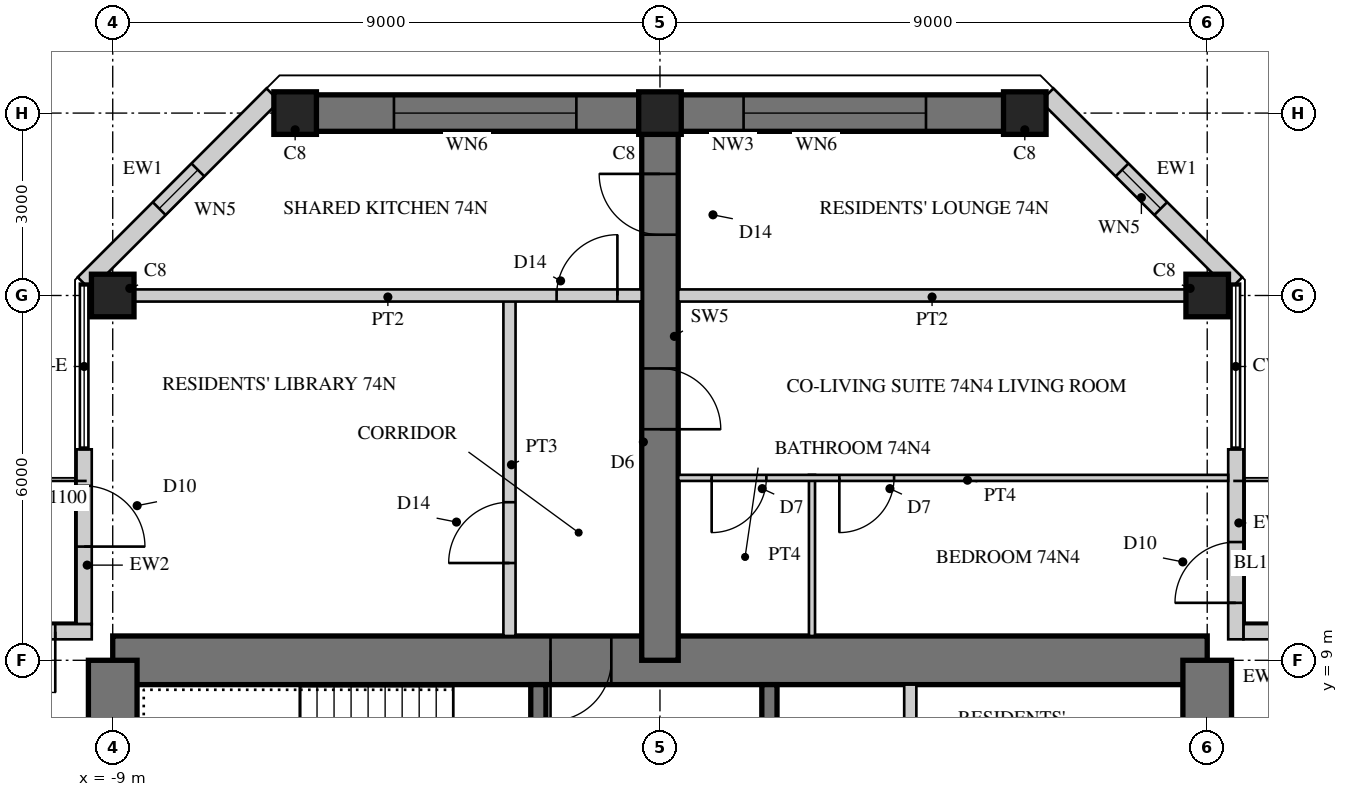
"""IFC4 building model, lengths in metres.
Left out: names, types, materials, properties, quantities, classifications, styles, units other than length and angle.
Written with IfcOpenShell. Run it as: python <this file> out.ifc"""

import sys

from ifc_helpers import new_model, si_unit, direction, frame, frame_2d, origin, origin_2d, place, context, subcontext, project, spatial, rectangle, hollow_rectangle, extrude, element, fill, save


model = new_model("IFC4")
c1 = context("Model", 3, precision=1e-05, world=origin(), true_north=direction((0.0, 1.0)))
c2 = subcontext(c1, "Body", "Model", "MODEL_VIEW")
j1 = project(units=[si_unit("LENGTHUNIT", "METRE"), si_unit("PLANEANGLEUNIT", "RADIAN")], contexts=[c1])
p1 = place(None, origin())
s1 = spatial("IfcSite", under=j1, at=p1, CompositionType="ELEMENT")
p2 = place(p1, origin())
s2 = spatial("IfcBuilding", under=s1, at=p2, CompositionType="ELEMENT")
p3 = place(p2, frame((0.0, 0.0, 284.9)))
s3 = spatial("IfcBuildingStorey", under=s2, at=p3, CompositionType="ELEMENT", Elevation=284.9)
p4 = place(p3, frame((9.0, 9.0, 0.0), z_axis=(0.0, 0.0, 1.0), x_axis=(-1.0, 0.0, 0.0)))
e1 = element("IfcWall", 1, at=p4, inside=s3, PredefinedType="SHEAR", context=c2, shape_type="SweptSolid", body=[
    extrude(rectangle(XDim=18.0, YDim=0.8, at=frame_2d((9.0, 0.0))), origin(), (0.0, 0.0, 1.0), 3.4),
])
p5 = place(p4, frame((9.8, 0.0, 0.0)))
e2 = element("IfcOpeningElement", 2, at=p5, cuts=e1, PredefinedType="OPENING", context=c2, shape_type="SweptSolid", body=[
    extrude(rectangle(XDim=1.0, YDim=2.4, at=frame_2d((0.5, 1.2))), frame((0.0, 0.41, 0.0), z_axis=(0.0, -1.0, 0.0), x_axis=(1.0, 0.0, 0.0)), (0.0, 0.0, 1.0), 0.82),
])
p6 = place(p3, frame((9.0, -9.0, 0.0), z_axis=(0.0, 0.0, 1.0), x_axis=(0.0, 1.0, 0.0)))
e3 = element("IfcWall", 3, at=p6, inside=s3, PredefinedType="SHEAR", context=c2, shape_type="SweptSolid", body=[
    extrude(rectangle(XDim=18.0, YDim=0.8, at=frame_2d((9.0, 0.0))), origin(), (0.0, 0.0, 1.0), 3.4),
])
p7 = place(p6, frame((9.8, 0.0, 0.0)))
e4 = element("IfcOpeningElement", 4, at=p7, cuts=e3, PredefinedType="OPENING", context=c2, shape_type="SweptSolid", body=[
    extrude(rectangle(XDim=1.0, YDim=2.4, at=frame_2d((0.5, 1.2))), frame((0.0, 0.41, 0.0), z_axis=(0.0, -1.0, 0.0), x_axis=(1.0, 0.0, 0.0)), (0.0, 0.0, 1.0), 0.82),
])
p8 = place(p3, frame((-9.0, 9.0, 0.0), z_axis=(0.0, 0.0, 1.0), x_axis=(0.0, -1.0, 0.0)))
e5 = element("IfcWall", 5, at=p8, inside=s3, PredefinedType="SHEAR", context=c2, shape_type="SweptSolid", body=[
    extrude(rectangle(XDim=18.0, YDim=0.8, at=frame_2d((9.0, 0.0))), origin(), (0.0, 0.0, 1.0), 3.4),
])
p9 = place(p8, frame((9.8, 0.0, 0.0)))
e6 = element("IfcOpeningElement", 6, at=p9, cuts=e5, PredefinedType="OPENING", context=c2, shape_type="SweptSolid", body=[
    extrude(rectangle(XDim=1.0, YDim=2.4, at=frame_2d((0.5, 1.2))), frame((0.0, 0.41, 0.0), z_axis=(0.0, -1.0, 0.0), x_axis=(1.0, 0.0, 0.0)), (0.0, 0.0, 1.0), 0.82),
])
p10 = place(p3, frame((1.8, 1.875, 0.0), z_axis=(0.0, 0.0, 1.0), x_axis=(0.0, 1.0, 0.0)))
e7 = element("IfcWall", 7, at=p10, inside=s3, PredefinedType="SHEAR", context=c2, shape_type="SweptSolid", body=[
    extrude(rectangle(XDim=6.725, YDim=0.25, at=frame_2d((3.363, 0.0))), origin(), (0.0, 0.0, 1.0), 3.4),
])
p11 = place(p10, frame((1.875, 0.0, 0.0)))
e8 = element("IfcOpeningElement", 8, at=p11, cuts=e7, PredefinedType="OPENING", context=c2, shape_type="SweptSolid", body=[
    extrude(rectangle(XDim=1.6, YDim=2.4, at=frame_2d((0.8, 1.2))), frame((0.0, 0.135, 0.0), z_axis=(0.0, -1.0, 0.0), x_axis=(1.0, 0.0, 0.0)), (0.0, 0.0, 1.0), 0.27),
])
p12 = place(p3, frame((4.117, 5.975, 0.0), z_axis=(0.0, 0.0, 1.0), x_axis=(0.0, 1.0, 0.0)))
e9 = element("IfcWall", 9, at=p12, inside=s3, PredefinedType="PARTITIONING", context=c2, shape_type="SweptSolid", body=[
    extrude(rectangle(XDim=2.625, YDim=0.2, at=frame_2d((1.312, 0.0))), origin(), (0.0, 0.0, 1.0), 3.4),
])
p13 = place(p3, frame((-2.0, 1.675, 0.0), z_axis=(0.0, 0.0, 1.0), x_axis=(0.0, 1.0, 0.0)))
e10 = element("IfcWall", 10, at=p13, inside=s3, PredefinedType="SHEAR", context=c2, shape_type="SweptSolid", body=[
    extrude(rectangle(XDim=6.925, YDim=0.25, at=frame_2d((3.462, 0.0))), origin(), (0.0, 0.0, 1.0), 3.4),
])
p14 = place(p13, frame((0.725, 0.0, 0.0)))
e11 = element("IfcOpeningElement", 11, at=p14, cuts=e10, PredefinedType="OPENING", context=c2, shape_type="SweptSolid", body=[
    extrude(rectangle(XDim=1.0, YDim=2.1, at=frame_2d((0.5, 1.05))), frame((0.0, 0.135, 0.0), z_axis=(0.0, -1.0, 0.0), x_axis=(1.0, 0.0, 0.0)), (0.0, 0.0, 1.0), 0.27),
])
p15 = place(p3, frame((0.0, 9.0, 0.0), z_axis=(0.0, 0.0, 1.0), x_axis=(0.0, 1.0, 0.0)))
e12 = element("IfcWall", 12, at=p15, inside=s3, PredefinedType="SHEAR", context=c2, shape_type="SweptSolid", body=[
    extrude(rectangle(XDim=9.0, YDim=0.6, at=frame_2d((4.5, 0.0))), origin(), (0.0, 0.0, 1.0), 3.4),
])
p16 = place(p15, frame((3.8, 0.0, 0.0)))
e13 = element("IfcOpeningElement", 13, at=p16, cuts=e12, PredefinedType="OPENING", context=c2, shape_type="SweptSolid", body=[
    extrude(rectangle(XDim=1.0, YDim=2.15, at=frame_2d((0.5, 1.075))), frame((0.0, 0.31, 0.0), z_axis=(0.0, -1.0, 0.0), x_axis=(1.0, 0.0, 0.0)), (0.0, 0.0, 1.0), 0.62),
])
p17 = place(p15, frame((7.0, 0.0, 0.0)))
e14 = element("IfcOpeningElement", 14, at=p17, cuts=e12, PredefinedType="OPENING", context=c2, shape_type="SweptSolid", body=[
    extrude(rectangle(XDim=1.0, YDim=2.2, at=frame_2d((0.5, 1.1))), frame((0.0, 0.31, 0.0), z_axis=(0.0, -1.0, 0.0), x_axis=(1.0, 0.0, 0.0)), (0.0, 0.0, 1.0), 0.62),
])
p18 = place(p3, frame((6.0, 18.0, 0.0), z_axis=(0.0, 0.0, 1.0), x_axis=(-1.0, 0.0, 0.0)))
e15 = element("IfcWall", 15, at=p18, inside=s3, PredefinedType="SHEAR", context=c2, shape_type="SweptSolid", body=[
    extrude(rectangle(XDim=12.0, YDim=0.6, at=frame_2d((6.0, 0.0))), origin(), (0.0, 0.0, 1.0), 3.4),
])
p19 = place(p18, frame((1.625, 0.0, 0.6)))
e16 = element("IfcOpeningElement", 16, at=p19, cuts=e15, PredefinedType="OPENING", context=c2, shape_type="SweptSolid", body=[
    extrude(rectangle(XDim=3.0, YDim=2.4, at=frame_2d((1.5, 1.2))), frame((0.0, 0.31, 0.0), z_axis=(0.0, -1.0, 0.0), x_axis=(1.0, 0.0, 0.0)), (0.0, 0.0, 1.0), 0.62),
])
p20 = place(p18, frame((7.375, 0.0, 0.6)))
e17 = element("IfcOpeningElement", 17, at=p20, cuts=e15, PredefinedType="OPENING", context=c2, shape_type="SweptSolid", body=[
    extrude(rectangle(XDim=3.0, YDim=2.4, at=frame_2d((1.5, 1.2))), frame((0.0, 0.31, 0.0), z_axis=(0.0, -1.0, 0.0), x_axis=(1.0, 0.0, 0.0)), (0.0, 0.0, 1.0), 0.62),
])
for number, where, z_axis, x_axis in (
    (18, (9.0, 15.0, 0.0), (0.0, 0.0, 1.0), (1.0, 0.0, 0.0)),
    (19, (-9.0, 15.0, 0.0), (0.0, 0.0, 1.0), (1.0, 0.0, 0.0)),
    (20, (6.0, 18.0, 0.0), (0.0, 0.0, 1.0), (1.0, 0.0, 0.0)),
    (21, (0.0, 18.0, 0.0), (0.0, 0.0, 1.0), (1.0, 0.0, 0.0)),
    (22, (-6.0, 18.0, 0.0), (0.0, 0.0, 1.0), (1.0, 0.0, 0.0)),
):
    element("IfcColumn", number, at=place(p3, frame(where, z_axis=z_axis, x_axis=x_axis)), inside=s3, PredefinedType="COLUMN", context=c2, shape_type="SweptSolid", body=[
        extrude(rectangle(XDim=0.7, YDim=0.7, at=origin_2d()), origin(), (0.0, 0.0, 1.0), 3.4),
    ])
p21 = place(p3, frame((12.47, 9.47, 0.0), z_axis=(0.0, 0.0, 1.0), x_axis=(-1.0, 0.0, 0.0)))
e23 = element("IfcWall", 23, at=p21, inside=s3, PredefinedType="SOLIDWALL", context=c2, shape_type="SweptSolid", body=[
    extrude(rectangle(XDim=2.875, YDim=0.25, at=frame_2d((1.438, 0.0))), origin(), (0.0, 0.0, 1.0), 3.2),
])
p22 = place(p21, frame((0.6, 0.0, 0.0)))
e24 = element("IfcOpeningElement", 24, at=p22, cuts=e23, PredefinedType="OPENING", context=c2, shape_type="SweptSolid", body=[
    extrude(rectangle(XDim=1.0, YDim=2.2, at=frame_2d((0.5, 1.1))), frame((0.0, 0.135, 0.0), z_axis=(0.0, -1.0, 0.0), x_axis=(1.0, 0.0, 0.0)), (0.0, 0.0, 1.0), 0.27),
])
p23 = place(p3, frame((9.47, 9.345, 0.0), z_axis=(0.0, 0.0, 1.0), x_axis=(0.0, 1.0, 0.0)))
e25 = element("IfcWall", 25, at=p23, inside=s3, PredefinedType="SOLIDWALL", context=c2, shape_type="SweptSolid", body=[
    extrude(rectangle(XDim=3.125, YDim=0.25, at=frame_2d((1.562, 0.0))), origin(), (0.0, 0.0, 1.0), 3.2),
])
p24 = place(p23, frame((0.6, 0.0, 0.0)))
e26 = element("IfcOpeningElement", 26, at=p24, cuts=e25, PredefinedType="OPENING", context=c2, shape_type="SweptSolid", body=[
    extrude(rectangle(XDim=1.0, YDim=2.2, at=frame_2d((0.5, 1.1))), frame((0.0, 0.135, 0.0), z_axis=(0.0, -1.0, 0.0), x_axis=(1.0, 0.0, 0.0)), (0.0, 0.0, 1.0), 0.27),
])
p25 = place(p3, frame((9.47, 15.195, 0.0), z_axis=(0.0, 0.0, 1.0), x_axis=(-0.70707898447, 0.707134576811, 0.0)))
e27 = element("IfcWall", 27, at=p25, inside=s3, PredefinedType="SOLIDWALL", context=c2, shape_type="SweptSolid", body=[
    extrude(rectangle(XDim=4.392, YDim=0.3, at=frame_2d((2.196, 0.0))), origin(), (0.0, 0.0, 1.0), 3.2),
])
p26 = place(p25, frame((1.746, 0.0, 0.3)))
e28 = element("IfcOpeningElement", 28, at=p26, cuts=e27, PredefinedType="OPENING", context=c2, shape_type="SweptSolid", body=[
    extrude(rectangle(XDim=0.9, YDim=2.4, at=frame_2d((0.45, 1.2))), frame((0.0, 0.16, 0.0), z_axis=(0.0, -1.0, 0.0), x_axis=(1.0, 0.0, 0.0)), (0.0, 0.0, 1.0), 0.32),
])
p27 = place(p3, frame((-6.365, 18.3, 0.0), z_axis=(0.0, 0.0, 1.0), x_axis=(-0.70707898447, -0.707134576811, 0.0)))
e29 = element("IfcWall", 29, at=p27, inside=s3, PredefinedType="SOLIDWALL", context=c2, shape_type="SweptSolid", body=[
    extrude(rectangle(XDim=4.392, YDim=0.3, at=frame_2d((2.196, 0.0))), origin(), (0.0, 0.0, 1.0), 3.2),
])
p28 = place(p27, frame((1.746, 0.0, 0.3)))
e30 = element("IfcOpeningElement", 30, at=p28, cuts=e29, PredefinedType="OPENING", context=c2, shape_type="SweptSolid", body=[
    extrude(rectangle(XDim=0.9, YDim=2.4, at=frame_2d((0.45, 1.2))), frame((0.0, 0.16, 0.0), z_axis=(0.0, -1.0, 0.0), x_axis=(1.0, 0.0, 0.0)), (0.0, 0.0, 1.0), 0.32),
])
p29 = place(p3, frame((-9.47, 12.47, 0.0), z_axis=(0.0, 0.0, 1.0), x_axis=(0.0, -1.0, 0.0)))
e31 = element("IfcWall", 31, at=p29, inside=s3, PredefinedType="SOLIDWALL", context=c2, shape_type="SweptSolid", body=[
    extrude(rectangle(XDim=2.875, YDim=0.25, at=frame_2d((1.438, 0.0))), origin(), (0.0, 0.0, 1.0), 3.2),
])
p30 = place(p29, frame((0.6, 0.0, 0.0)))
e32 = element("IfcOpeningElement", 32, at=p30, cuts=e31, PredefinedType="OPENING", context=c2, shape_type="SweptSolid", body=[
    extrude(rectangle(XDim=1.0, YDim=2.2, at=frame_2d((0.5, 1.1))), frame((0.0, 0.135, 0.0), z_axis=(0.0, -1.0, 0.0), x_axis=(1.0, 0.0, 0.0)), (0.0, 0.0, 1.0), 0.27),
])
p31 = place(p3, frame((-9.345, 9.47, 0.0), z_axis=(0.0, 0.0, 1.0), x_axis=(-1.0, 0.0, 0.0)))
e33 = element("IfcWall", 33, at=p31, inside=s3, PredefinedType="SOLIDWALL", context=c2, shape_type="SweptSolid", body=[
    extrude(rectangle(XDim=3.125, YDim=0.25, at=frame_2d((1.562, 0.0))), origin(), (0.0, 0.0, 1.0), 3.2),
])
p32 = place(p31, frame((0.6, 0.0, 0.0)))
e34 = element("IfcOpeningElement", 34, at=p32, cuts=e33, PredefinedType="OPENING", context=c2, shape_type="SweptSolid", body=[
    extrude(rectangle(XDim=1.0, YDim=2.2, at=frame_2d((0.5, 1.1))), frame((0.0, 0.135, 0.0), z_axis=(0.0, -1.0, 0.0), x_axis=(1.0, 0.0, 0.0)), (0.0, 0.0, 1.0), 0.27),
])
p33 = place(p3, frame((2.5, 9.4, 0.0), z_axis=(0.0, 0.0, 1.0), x_axis=(0.0, 1.0, 0.0)))
e35 = element("IfcWall", 35, at=p33, inside=s3, PredefinedType="PARTITIONING", context=c2, shape_type="SweptSolid", body=[
    extrude(rectangle(XDim=2.65, YDim=0.1, at=frame_2d((1.325, 0.0))), origin(), (0.0, 0.0, 1.0), 3.2),
])
p34 = place(p3, frame((9.345, 12.0, 0.0), z_axis=(0.0, 0.0, 1.0), x_axis=(-1.0, 0.0, 0.0)))
e36 = element("IfcWall", 36, at=p34, inside=s3, PredefinedType="PARTITIONING", context=c2, shape_type="SweptSolid", body=[
    extrude(rectangle(XDim=9.045, YDim=0.1, at=frame_2d((4.522, 0.0))), origin(), (0.0, 0.0, 1.0), 3.2),
])
p35 = place(p34, frame((5.495, 0.0, 0.0)))
e37 = element("IfcOpeningElement", 37, at=p35, cuts=e36, PredefinedType="OPENING", context=c2, shape_type="SweptSolid", body=[
    extrude(rectangle(XDim=0.9, YDim=2.1, at=frame_2d((0.45, 1.05))), frame((0.0, 0.06, 0.0), z_axis=(0.0, -1.0, 0.0), x_axis=(1.0, 0.0, 0.0)), (0.0, 0.0, 1.0), 0.12),
])
p36 = place(p34, frame((7.595, 0.0, 0.0)))
e38 = element("IfcOpeningElement", 38, at=p36, cuts=e36, PredefinedType="OPENING", context=c2, shape_type="SweptSolid", body=[
    extrude(rectangle(XDim=0.9, YDim=2.1, at=frame_2d((0.45, 1.05))), frame((0.0, 0.06, 0.0), z_axis=(0.0, -1.0, 0.0), x_axis=(1.0, 0.0, 0.0)), (0.0, 0.0, 1.0), 0.12),
])
p37 = place(p3, frame((-2.475, 9.4, 0.0), z_axis=(0.0, 0.0, 1.0), x_axis=(0.0, 1.0, 0.0)))
e39 = element("IfcWall", 39, at=p37, inside=s3, PredefinedType="SOLIDWALL", context=c2, shape_type="SweptSolid", body=[
    extrude(rectangle(XDim=5.6, YDim=0.2, at=frame_2d((2.8, 0.0))), origin(), (0.0, 0.0, 1.0), 3.2),
])
p38 = place(p37, frame((1.2, 0.0, 0.0)))
e40 = element("IfcOpeningElement", 40, at=p38, cuts=e39, PredefinedType="OPENING", context=c2, shape_type="SweptSolid", body=[
    extrude(rectangle(XDim=1.0, YDim=2.2, at=frame_2d((0.5, 1.1))), frame((0.0, 0.11, 0.0), z_axis=(0.0, -1.0, 0.0), x_axis=(1.0, 0.0, 0.0)), (0.0, 0.0, 1.0), 0.22),
])
p39 = place(p3, frame((8.65, 15.0, 0.0), z_axis=(0.0, 0.0, 1.0), x_axis=(-1.0, 0.0, 0.0)))
e41 = element("IfcWall", 41, at=p39, inside=s3, PredefinedType="SOLIDWALL", context=c2, shape_type="SweptSolid", body=[
    extrude(rectangle(XDim=8.35, YDim=0.2, at=frame_2d((4.175, 0.0))), origin(), (0.0, 0.0, 1.0), 2.5),
])
p40 = place(p3, frame((-0.3, 15.0, 0.0), z_axis=(0.0, 0.0, 1.0), x_axis=(-1.0, 0.0, 0.0)))
e42 = element("IfcWall", 42, at=p40, inside=s3, PredefinedType="SOLIDWALL", context=c2, shape_type="SweptSolid", body=[
    extrude(rectangle(XDim=8.35, YDim=0.2, at=frame_2d((4.175, 0.0))), origin(), (0.0, 0.0, 1.0), 2.5),
])
p41 = place(p40, frame((0.4, 0.0, 0.0)))
e43 = element("IfcOpeningElement", 43, at=p41, cuts=e42, PredefinedType="OPENING", context=c2, shape_type="SweptSolid", body=[
    extrude(rectangle(XDim=1.0, YDim=2.2, at=frame_2d((0.5, 1.1))), frame((0.0, 0.11, 0.0), z_axis=(0.0, -1.0, 0.0), x_axis=(1.0, 0.0, 0.0)), (0.0, 0.0, 1.0), 0.22),
])
p42 = place(p24, origin())
e44 = element("IfcDoor", 44, at=p42, inside=s3, OperationType="SINGLE_SWING_LEFT", PredefinedType="DOOR", context=c2, shape_type="SweptSolid", body=[
    extrude(hollow_rectangle(XDim=1.0, YDim=2.2, WallThickness=0.06, at=frame_2d((0.5, 1.1))), frame((0.0, 0.025, 0.0), z_axis=(0.0, -1.0, 0.0), x_axis=(1.0, 0.0, 0.0)), (0.0, 0.0, 1.0), 0.05),
    extrude(rectangle(XDim=0.879, YDim=2.079, at=frame_2d((0.5, 1.1))), frame((0.0, 0.025, 0.0), z_axis=(0.0, -1.0, 0.0), x_axis=(1.0, 0.0, 0.0)), (0.0, 0.0, 1.0), 0.05),
])
fill(e26, e44)
p43 = place(p26, origin())
e45 = element("IfcWindow", 45, at=p43, inside=s3, PartitioningType="SINGLE_PANEL", PredefinedType="WINDOW", context=c2, shape_type="SweptSolid", body=[
    extrude(hollow_rectangle(XDim=0.9, YDim=2.4, WallThickness=0.06, at=frame_2d((0.45, 1.2))), frame((0.0, 0.03, 0.0), z_axis=(0.0, -1.0, 0.0), x_axis=(1.0, 0.0, 0.0)), (0.0, 0.0, 1.0), 0.06),
    extrude(rectangle(XDim=0.779, YDim=2.279, at=frame_2d((0.45, 1.2))), frame((0.0, 0.03, 0.0), z_axis=(0.0, -1.0, 0.0), x_axis=(1.0, 0.0, 0.0)), (0.0, 0.0, 1.0), 0.06),
])
fill(e28, e45)
p44 = place(p19, origin())
e46 = element("IfcWindow", 46, at=p44, inside=s3, PartitioningType="SINGLE_PANEL", PredefinedType="WINDOW", context=c2, shape_type="SweptSolid", body=[
    extrude(hollow_rectangle(XDim=3.0, YDim=2.4, WallThickness=0.06, at=frame_2d((1.5, 1.2))), frame((0.0, 0.03, 0.0), z_axis=(0.0, -1.0, 0.0), x_axis=(1.0, 0.0, 0.0)), (0.0, 0.0, 1.0), 0.06),
    extrude(rectangle(XDim=2.879, YDim=2.279, at=frame_2d((1.5, 1.2))), frame((0.0, 0.03, 0.0), z_axis=(0.0, -1.0, 0.0), x_axis=(1.0, 0.0, 0.0)), (0.0, 0.0, 1.0), 0.06),
])
fill(e16, e46)
p45 = place(p20, origin())
e47 = element("IfcWindow", 47, at=p45, inside=s3, PartitioningType="SINGLE_PANEL", PredefinedType="WINDOW", context=c2, shape_type="SweptSolid", body=[
    extrude(hollow_rectangle(XDim=3.0, YDim=2.4, WallThickness=0.06, at=frame_2d((1.5, 1.2))), frame((0.0, 0.03, 0.0), z_axis=(0.0, -1.0, 0.0), x_axis=(1.0, 0.0, 0.0)), (0.0, 0.0, 1.0), 0.06),
    extrude(rectangle(XDim=2.879, YDim=2.279, at=frame_2d((1.5, 1.2))), frame((0.0, 0.03, 0.0), z_axis=(0.0, -1.0, 0.0), x_axis=(1.0, 0.0, 0.0)), (0.0, 0.0, 1.0), 0.06),
])
fill(e17, e47)
p46 = place(p28, origin())
e48 = element("IfcWindow", 48, at=p46, inside=s3, PartitioningType="SINGLE_PANEL", PredefinedType="WINDOW", context=c2, shape_type="SweptSolid", body=[
    extrude(hollow_rectangle(XDim=0.9, YDim=2.4, WallThickness=0.06, at=frame_2d((0.45, 1.2))), frame((0.0, 0.03, 0.0), z_axis=(0.0, -1.0, 0.0), x_axis=(1.0, 0.0, 0.0)), (0.0, 0.0, 1.0), 0.06),
    extrude(rectangle(XDim=0.779, YDim=2.279, at=frame_2d((0.45, 1.2))), frame((0.0, 0.03, 0.0), z_axis=(0.0, -1.0, 0.0), x_axis=(1.0, 0.0, 0.0)), (0.0, 0.0, 1.0), 0.06),
])
fill(e30, e48)
p47 = place(p30, origin())
e49 = element("IfcDoor", 49, at=p47, inside=s3, OperationType="SINGLE_SWING_RIGHT", PredefinedType="DOOR", context=c2, shape_type="SweptSolid", body=[
    extrude(hollow_rectangle(XDim=1.0, YDim=2.2, WallThickness=0.06, at=frame_2d((0.5, 1.1))), frame((0.0, 0.025, 0.0), z_axis=(0.0, -1.0, 0.0), x_axis=(1.0, 0.0, 0.0)), (0.0, 0.0, 1.0), 0.05),
    extrude(rectangle(XDim=0.879, YDim=2.079, at=frame_2d((0.5, 1.1))), frame((0.0, 0.025, 0.0), z_axis=(0.0, -1.0, 0.0), x_axis=(1.0, 0.0, 0.0)), (0.0, 0.0, 1.0), 0.05),
])
fill(e32, e49)
p48 = place(p32, origin())
e50 = element("IfcDoor", 50, at=p48, inside=s3, OperationType="SINGLE_SWING_LEFT", PredefinedType="DOOR", context=c2, shape_type="SweptSolid", body=[
    extrude(hollow_rectangle(XDim=1.0, YDim=2.2, WallThickness=0.06, at=frame_2d((0.5, 1.1))), frame((0.0, 0.025, 0.0), z_axis=(0.0, -1.0, 0.0), x_axis=(1.0, 0.0, 0.0)), (0.0, 0.0, 1.0), 0.05),
    extrude(rectangle(XDim=0.879, YDim=2.079, at=frame_2d((0.5, 1.1))), frame((0.0, 0.025, 0.0), z_axis=(0.0, -1.0, 0.0), x_axis=(1.0, 0.0, 0.0)), (0.0, 0.0, 1.0), 0.05),
])
fill(e34, e50)
p49 = place(p35, origin())
e51 = element("IfcDoor", 51, at=p49, inside=s3, OperationType="SINGLE_SWING_RIGHT", PredefinedType="DOOR", context=c2, shape_type="SweptSolid", body=[
    extrude(rectangle(XDim=0.9, YDim=2.1, at=frame_2d((0.45, 1.05))), frame((0.0, 0.025, 0.0), z_axis=(0.0, -1.0, 0.0), x_axis=(1.0, 0.0, 0.0)), (0.0, 0.0, 1.0), 0.05),
])
fill(e37, e51)
p50 = place(p36, origin())
e52 = element("IfcDoor", 52, at=p50, inside=s3, OperationType="SINGLE_SWING_RIGHT", PredefinedType="DOOR", context=c2, shape_type="SweptSolid", body=[
    extrude(rectangle(XDim=0.9, YDim=2.1, at=frame_2d((0.45, 1.05))), frame((0.0, 0.025, 0.0), z_axis=(0.0, -1.0, 0.0), x_axis=(1.0, 0.0, 0.0)), (0.0, 0.0, 1.0), 0.05),
])
fill(e38, e52)
p51 = place(p38, origin())
e53 = element("IfcDoor", 53, at=p51, inside=s3, OperationType="SINGLE_SWING_LEFT", PredefinedType="DOOR", context=c2, shape_type="SweptSolid", body=[
    extrude(rectangle(XDim=1.0, YDim=2.2, at=frame_2d((0.5, 1.1))), frame((0.0, 0.025, 0.0), z_axis=(0.0, -1.0, 0.0), x_axis=(1.0, 0.0, 0.0)), (0.0, 0.0, 1.0), 0.05),
])
fill(e40, e53)
p52 = place(p41, frame((1.0, 0.0, 0.0), z_axis=(0.0, 0.0, 1.0), x_axis=(-1.0, 0.0, 0.0)))
e54 = element("IfcDoor", 54, at=p52, inside=s3, OperationType="SINGLE_SWING_RIGHT", PredefinedType="DOOR", context=c2, shape_type="SweptSolid", body=[
    extrude(rectangle(XDim=1.0, YDim=2.2, at=frame_2d((0.5, 1.1))), frame((0.0, 0.025, 0.0), z_axis=(0.0, -1.0, 0.0), x_axis=(1.0, 0.0, 0.0)), (0.0, 0.0, 1.0), 0.05),
])
fill(e43, e54)
p53 = place(p16, frame((1.0, 0.0, 0.0), z_axis=(0.0, 0.0, 1.0), x_axis=(-1.0, 0.0, 0.0)))
e55 = element("IfcDoor", 55, at=p53, inside=s3, OperationType="SINGLE_SWING_RIGHT", PredefinedType="DOOR", context=c2, shape_type="SweptSolid", body=[
    extrude(rectangle(XDim=1.0, YDim=2.15, at=frame_2d((0.5, 1.075))), frame((0.0, 0.025, 0.0), z_axis=(0.0, -1.0, 0.0), x_axis=(1.0, 0.0, 0.0)), (0.0, 0.0, 1.0), 0.05),
])
fill(e13, e55)
p54 = place(p17, origin())
e56 = element("IfcDoor", 56, at=p54, inside=s3, OperationType="SINGLE_SWING_RIGHT", PredefinedType="DOOR", context=c2, shape_type="SweptSolid", body=[
    extrude(rectangle(XDim=1.0, YDim=2.2, at=frame_2d((0.5, 1.1))), frame((0.0, 0.025, 0.0), z_axis=(0.0, -1.0, 0.0), x_axis=(1.0, 0.0, 0.0)), (0.0, 0.0, 1.0), 0.05),
])
fill(e14, e56)
p55 = place(p5, origin())
e57 = element("IfcDoor", 57, at=p55, inside=s3, OperationType="SINGLE_SWING_RIGHT", PredefinedType="DOOR", context=c2, shape_type="SweptSolid", body=[
    extrude(rectangle(XDim=1.0, YDim=2.4, at=frame_2d((0.5, 1.2))), frame((0.0, 0.055, 0.0), z_axis=(0.0, -1.0, 0.0), x_axis=(1.0, 0.0, 0.0)), (0.0, 0.0, 1.0), 0.05),
])
fill(e2, e57)
save(model, sys.argv[1])
